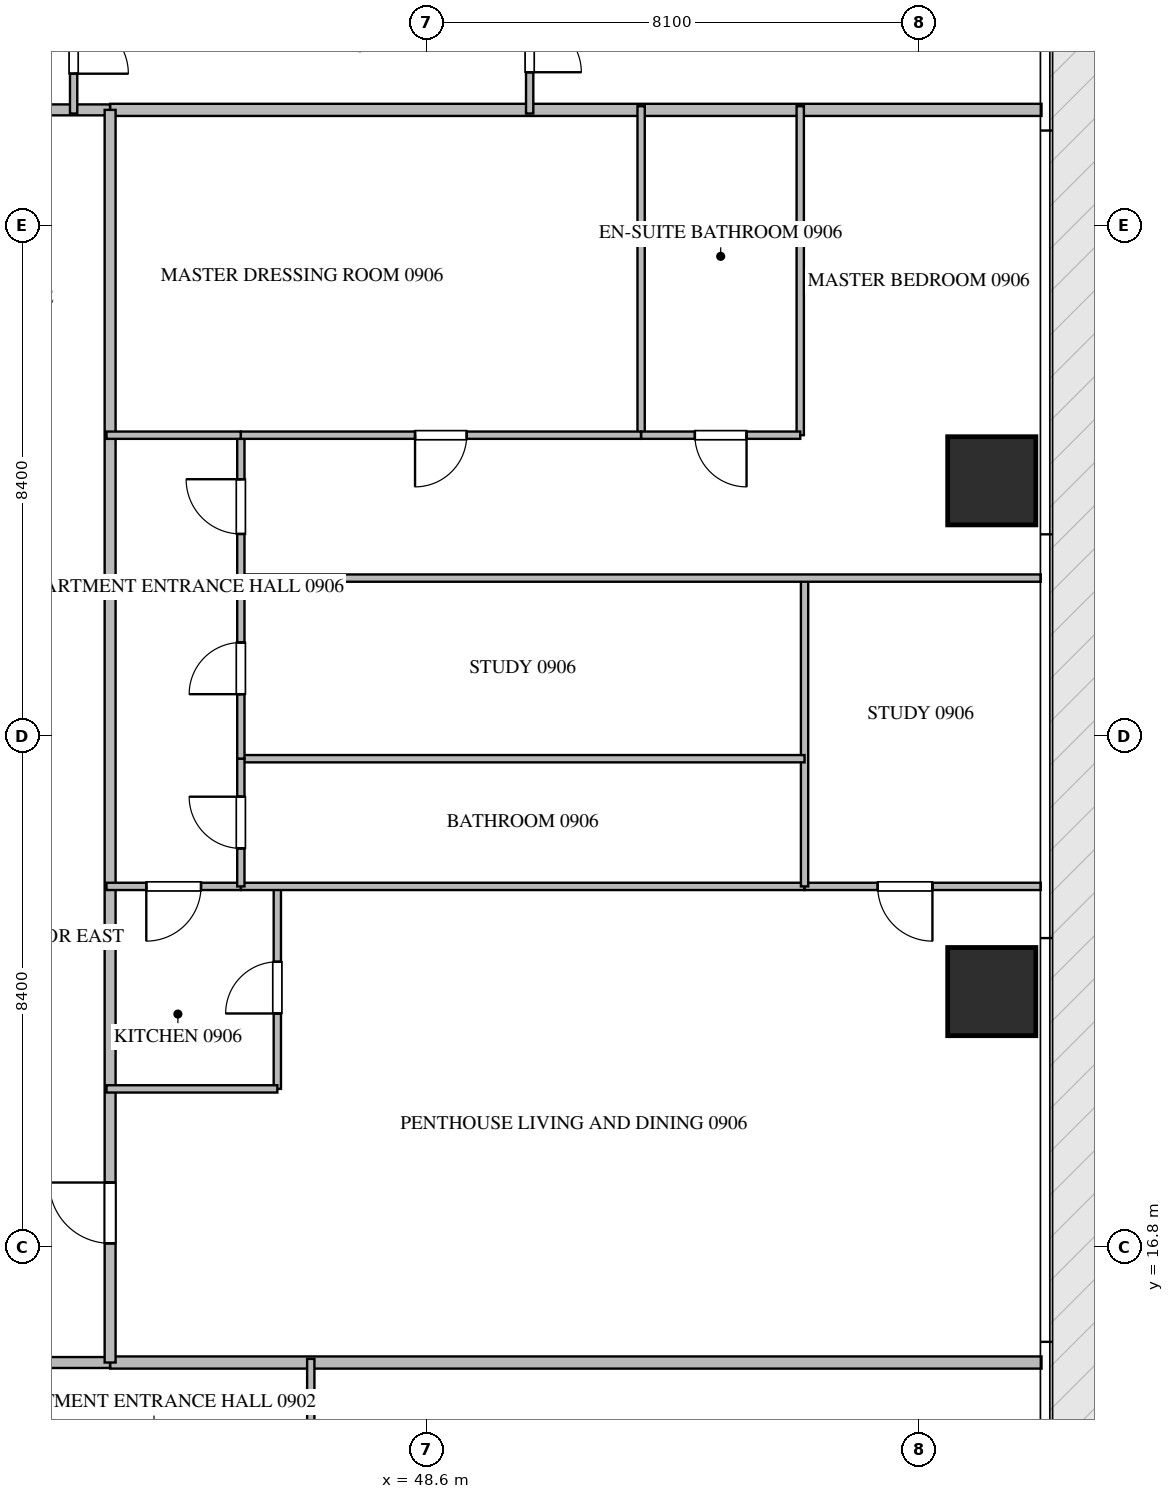
"""IFC4 building model, lengths in metres.
Left out: names, types, materials, properties, quantities, classifications, styles, units other than length and angle.
Written with IfcOpenShell. Run it as: python <this file> out.ifc"""

import sys

from ifc_helpers import new_model, si_unit, direction, frame, frame_2d, origin, origin_2d, place, context, subcontext, project, spatial, rectangle, extrude, source, transform, mapped, element, fill, save


model = new_model("IFC4")
c1 = context("Model", 3, precision=1e-05, world=origin(), true_north=direction((0.0, 1.0)))
c2 = subcontext(c1, "Body", "Model", "MODEL_VIEW")
j1 = project(units=[si_unit("LENGTHUNIT", "METRE"), si_unit("PLANEANGLEUNIT", "RADIAN")], contexts=[c1])
p1 = place(None, origin())
s1 = spatial("IfcSite", under=j1, at=p1, CompositionType="ELEMENT")
p2 = place(p1, origin())
s2 = spatial("IfcBuilding", under=s1, at=p2, CompositionType="ELEMENT")
p3 = place(p2, frame((0.0, 0.0, 41.7)))
s3 = spatial("IfcBuildingStorey", under=s2, at=p3, CompositionType="ELEMENT", Elevation=41.7)
m1 = source(origin(), c2, "Body", "SweptSolid", [
    extrude(rectangle(XDim=1.45, YDim=1.45, at=origin_2d()), origin(), (0.0, 0.0, 1.0), 3.75),
])
for number, where, z_axis, x_axis in (
    (1, (57.9, 21.0, -0.26), (0.0, 0.0, 1.0), (1.0, 0.0, 0.0)),
    (2, (57.9, 29.4, -0.26), (0.0, 0.0, 1.0), (1.0, 0.0, 0.0)),
):
    element("IfcColumn", number, at=place(p3, frame(where, z_axis=z_axis, x_axis=x_axis)), inside=s3, PredefinedType="COLUMN", context=c2, shape_type="MappedRepresentation", body=[
        mapped(m1, transform((0.0, 0.0, 0.0), scale=1.0)),
    ])
for number, where, z_axis, x_axis in (
    (3, (43.4, 14.9, 0.0), (0.0, 0.0, 1.0), (1.0, 0.0, 0.0)),
    (4, (43.4, 35.5, 0.0), (0.0, 0.0, 1.0), (1.0, 0.0, 0.0)),
):
    element("IfcWall", number, at=place(p3, frame(where, z_axis=z_axis, x_axis=x_axis)), inside=s3, PredefinedType="PARTITIONING", context=c2, shape_type="SweptSolid", body=[
        extrude(rectangle(XDim=15.318, YDim=0.2, at=frame_2d((7.659, 0.0))), origin(), (0.0, 0.0, 1.0), 3.49),
    ])
p4 = place(p3, frame((21.402, 14.9, 0.0), z_axis=(0.0, 0.0, 1.0), x_axis=(1.0, 0.0, 0.0)))
e5 = element("IfcWall", 5, at=p4, inside=s3, PredefinedType="PARTITIONING", context=c2, shape_type="SweptSolid", body=[
    extrude(rectangle(XDim=21.996, YDim=0.18, at=frame_2d((10.998, 0.0))), origin(), (0.0, 0.0, 1.0), 3.49),
])
p5 = place(p4, frame((5.816, 0.0, 0.0)))
e6 = element("IfcOpeningElement", 6, at=p5, cuts=e5, PredefinedType="OPENING", context=c2, shape_type="SweptSolid", body=[
    extrude(rectangle(XDim=1.0, YDim=2.15, at=frame_2d((0.5, 1.075))), frame((0.0, 0.1, 0.0), z_axis=(0.0, -1.0, 0.0), x_axis=(1.0, 0.0, 0.0)), (0.0, 0.0, 1.0), 0.2),
])
p6 = place(p4, frame((11.044, 0.0, 0.0)))
e7 = element("IfcOpeningElement", 7, at=p6, cuts=e5, PredefinedType="OPENING", context=c2, shape_type="SweptSolid", body=[
    extrude(rectangle(XDim=1.0, YDim=2.15, at=frame_2d((0.5, 1.075))), frame((0.0, 0.1, 0.0), z_axis=(0.0, -1.0, 0.0), x_axis=(1.0, 0.0, 0.0)), (0.0, 0.0, 1.0), 0.2),
])
p7 = place(p3, frame((21.402, 35.5, 0.0), z_axis=(0.0, 0.0, 1.0), x_axis=(1.0, 0.0, 0.0)))
e8 = element("IfcWall", 8, at=p7, inside=s3, PredefinedType="PARTITIONING", context=c2, shape_type="SweptSolid", body=[
    extrude(rectangle(XDim=21.996, YDim=0.18, at=frame_2d((10.998, 0.0))), origin(), (0.0, 0.0, 1.0), 3.49),
])
p8 = place(p7, frame((9.952, 0.0, 0.0)))
e9 = element("IfcOpeningElement", 9, at=p8, cuts=e8, PredefinedType="OPENING", context=c2, shape_type="SweptSolid", body=[
    extrude(rectangle(XDim=1.0, YDim=2.15, at=frame_2d((0.5, 1.075))), frame((0.0, 0.1, 0.0), z_axis=(0.0, -1.0, 0.0), x_axis=(1.0, 0.0, 0.0)), (0.0, 0.0, 1.0), 0.2),
])
p9 = place(p7, frame((15.18, 0.0, 0.0)))
e10 = element("IfcOpeningElement", 10, at=p9, cuts=e8, PredefinedType="OPENING", context=c2, shape_type="SweptSolid", body=[
    extrude(rectangle(XDim=1.0, YDim=2.15, at=frame_2d((0.5, 1.075))), frame((0.0, 0.1, 0.0), z_axis=(0.0, -1.0, 0.0), x_axis=(1.0, 0.0, 0.0)), (0.0, 0.0, 1.0), 0.2),
])
p10 = place(p3, frame((43.4, 14.9, 0.0), z_axis=(0.0, 0.0, 1.0), x_axis=(0.0, 1.0, 0.0)))
e11 = element("IfcWall", 11, at=p10, inside=s3, PredefinedType="PARTITIONING", context=c2, shape_type="SweptSolid", body=[
    extrude(rectangle(XDim=20.6, YDim=0.18, at=frame_2d((10.3, 0.0))), origin(), (0.0, 0.0, 1.0), 3.49),
])
p11 = place(p10, frame((1.96, 0.0, 0.0)))
e12 = element("IfcOpeningElement", 12, at=p11, cuts=e11, PredefinedType="OPENING", context=c2, shape_type="SweptSolid", body=[
    extrude(rectangle(XDim=1.0, YDim=2.15, at=frame_2d((0.5, 1.075))), frame((0.0, 0.1, 0.0), z_axis=(0.0, -1.0, 0.0), x_axis=(1.0, 0.0, 0.0)), (0.0, 0.0, 1.0), 0.2),
])
p12 = place(p3, frame((46.7, 12.752, 0.0), z_axis=(0.0, 0.0, 1.0), x_axis=(0.0, 1.0, 0.0)))
e13 = element("IfcWall", 13, at=p12, inside=s3, PredefinedType="PARTITIONING", context=c2, shape_type="SweptSolid", body=[
    extrude(rectangle(XDim=2.208, YDim=0.12, at=frame_2d((1.104, 0.0))), origin(), (0.0, 0.0, 1.0), 3.49),
])
p13 = place(p3, frame((42.8, 37.65, 0.0), z_axis=(0.0, 0.0, 1.0), x_axis=(0.0, -1.0, 0.0)))
e14 = element("IfcWall", 14, at=p13, inside=s3, PredefinedType="PARTITIONING", context=c2, shape_type="SweptSolid", body=[
    extrude(rectangle(XDim=2.21, YDim=0.12, at=frame_2d((1.105, 0.0))), origin(), (0.0, 0.0, 1.0), 3.49),
])
p14 = place(p13, frame((0.655, 0.0, 0.0)))
e15 = element("IfcOpeningElement", 15, at=p14, cuts=e14, PredefinedType="OPENING", context=c2, shape_type="SweptSolid", body=[
    extrude(rectangle(XDim=0.9, YDim=2.1, at=frame_2d((0.45, 1.05))), frame((0.0, 0.07, 0.0), z_axis=(0.0, -1.0, 0.0), x_axis=(1.0, 0.0, 0.0)), (0.0, 0.0, 1.0), 0.14),
])
p15 = place(p3, frame((50.3, 37.648, 0.0), z_axis=(0.0, 0.0, 1.0), x_axis=(0.0, -1.0, 0.0)))
e16 = element("IfcWall", 16, at=p15, inside=s3, PredefinedType="PARTITIONING", context=c2, shape_type="SweptSolid", body=[
    extrude(rectangle(XDim=2.208, YDim=0.12, at=frame_2d((1.104, 0.0))), origin(), (0.0, 0.0, 1.0), 3.49),
])
p16 = place(p15, frame((0.679, 0.0, 0.0)))
e17 = element("IfcOpeningElement", 17, at=p16, cuts=e16, PredefinedType="OPENING", context=c2, shape_type="SweptSolid", body=[
    extrude(rectangle(XDim=0.85, YDim=2.1, at=frame_2d((0.425, 1.05))), frame((0.0, 0.07, 0.0), z_axis=(0.0, -1.0, 0.0), x_axis=(1.0, 0.0, 0.0)), (0.0, 0.0, 1.0), 0.14),
])
p17 = place(p3, frame((46.15, 19.4, 0.0), z_axis=(0.0, 0.0, 1.0), x_axis=(0.0, 1.0, 0.0)))
e18 = element("IfcWall", 18, at=p17, inside=s3, PredefinedType="PARTITIONING", context=c2, shape_type="SweptSolid", body=[
    extrude(rectangle(XDim=3.33, YDim=0.12, at=frame_2d((1.665, 0.0))), origin(), (0.0, 0.0, 1.0), 3.49),
])
p18 = place(p17, frame((1.24, 0.0, 0.0)))
e19 = element("IfcOpeningElement", 19, at=p18, cuts=e18, PredefinedType="OPENING", context=c2, shape_type="SweptSolid", body=[
    extrude(rectangle(XDim=0.85, YDim=2.1, at=frame_2d((0.425, 1.05))), frame((0.0, 0.07, 0.0), z_axis=(0.0, -1.0, 0.0), x_axis=(1.0, 0.0, 0.0)), (0.0, 0.0, 1.0), 0.14),
])
p19 = place(p3, frame((46.15, 19.4, 0.0), z_axis=(0.0, 0.0, 1.0), x_axis=(-1.0, 0.0, 0.0)))
e20 = element("IfcWall", 20, at=p19, inside=s3, PredefinedType="PARTITIONING", context=c2, shape_type="SweptSolid", body=[
    extrude(rectangle(XDim=2.81, YDim=0.12, at=frame_2d((1.405, 0.0))), origin(), (0.0, 0.0, 1.0), 3.49),
])
p20 = place(p3, frame((45.55, 22.73, 0.0), z_axis=(0.0, 0.0, 1.0), x_axis=(-1.0, 0.0, 0.0)))
e21 = element("IfcWall", 21, at=p20, inside=s3, PredefinedType="PARTITIONING", context=c2, shape_type="SweptSolid", body=[
    extrude(rectangle(XDim=2.21, YDim=0.12, at=frame_2d((1.105, 0.0))), origin(), (0.0, 0.0, 1.0), 3.49),
])
p21 = place(p20, frame((0.655, 0.0, 0.0)))
e22 = element("IfcOpeningElement", 22, at=p21, cuts=e21, PredefinedType="OPENING", context=c2, shape_type="SweptSolid", body=[
    extrude(rectangle(XDim=0.9, YDim=2.1, at=frame_2d((0.45, 1.05))), frame((0.0, 0.07, 0.0), z_axis=(0.0, -1.0, 0.0), x_axis=(1.0, 0.0, 0.0)), (0.0, 0.0, 1.0), 0.14),
])
p22 = place(p3, frame((58.705, 22.73, 0.0), z_axis=(0.0, 0.0, 1.0), x_axis=(-1.0, 0.0, 0.0)))
e23 = element("IfcWall", 23, at=p22, inside=s3, PredefinedType="PARTITIONING", context=c2, shape_type="SweptSolid", body=[
    extrude(rectangle(XDim=3.884, YDim=0.12, at=frame_2d((1.942, 0.0))), origin(), (0.0, 0.0, 1.0), 3.49),
])
p23 = place(p22, frame((1.781, 0.0, 0.0)))
e24 = element("IfcOpeningElement", 24, at=p23, cuts=e23, PredefinedType="OPENING", context=c2, shape_type="SweptSolid", body=[
    extrude(rectangle(XDim=0.9, YDim=2.1, at=frame_2d((0.45, 1.05))), frame((0.0, 0.07, 0.0), z_axis=(0.0, -1.0, 0.0), x_axis=(1.0, 0.0, 0.0)), (0.0, 0.0, 1.0), 0.14),
])
p24 = place(p3, frame((54.819, 22.73, 0.0), z_axis=(0.0, 0.0, 1.0), x_axis=(-1.0, 0.0, 0.0)))
e25 = element("IfcWall", 25, at=p24, inside=s3, PredefinedType="PARTITIONING", context=c2, shape_type="SweptSolid", body=[
    extrude(rectangle(XDim=9.267, YDim=0.12, at=frame_2d((4.634, 0.0))), origin(), (0.0, 0.0, 1.0), 3.49),
])
p25 = place(p3, frame((54.821, 22.73, 0.0), z_axis=(0.0, 0.0, 1.0), x_axis=(0.0, 1.0, 0.0)))
e26 = element("IfcWall", 26, at=p25, inside=s3, PredefinedType="PARTITIONING", context=c2, shape_type="SweptSolid", body=[
    extrude(rectangle(XDim=5.07, YDim=0.12, at=frame_2d((2.535, 0.0))), origin(), (0.0, 0.0, 1.0), 3.49),
])
p26 = place(p3, frame((58.705, 27.8, 0.0), z_axis=(0.0, 0.0, 1.0), x_axis=(-1.0, 0.0, 0.0)))
e27 = element("IfcWall", 27, at=p26, inside=s3, PredefinedType="PARTITIONING", context=c2, shape_type="SweptSolid", body=[
    extrude(rectangle(XDim=13.155, YDim=0.12, at=frame_2d((6.578, 0.0))), origin(), (0.0, 0.0, 1.0), 3.49),
])
p27 = place(p3, frame((54.821, 24.83, 0.0), z_axis=(0.0, 0.0, 1.0), x_axis=(-1.0, 0.0, 0.0)))
e28 = element("IfcWall", 28, at=p27, inside=s3, PredefinedType="PARTITIONING", context=c2, shape_type="SweptSolid", body=[
    extrude(rectangle(XDim=9.271, YDim=0.12, at=frame_2d((4.635, 0.0))), origin(), (0.0, 0.0, 1.0), 3.49),
])
p28 = place(p3, frame((45.55, 22.73, 0.0), z_axis=(0.0, 0.0, 1.0), x_axis=(0.0, 1.0, 0.0)))
e29 = element("IfcWall", 29, at=p28, inside=s3, PredefinedType="PARTITIONING", context=c2, shape_type="SweptSolid", body=[
    extrude(rectangle(XDim=2.1, YDim=0.12, at=frame_2d((1.05, 0.0))), origin(), (0.0, 0.0, 1.0), 3.49),
])
p29 = place(p28, frame((0.625, 0.0, 0.0)))
e30 = element("IfcOpeningElement", 30, at=p29, cuts=e29, PredefinedType="OPENING", context=c2, shape_type="SweptSolid", body=[
    extrude(rectangle(XDim=0.85, YDim=2.1, at=frame_2d((0.425, 1.05))), frame((0.0, 0.07, 0.0), z_axis=(0.0, -1.0, 0.0), x_axis=(1.0, 0.0, 0.0)), (0.0, 0.0, 1.0), 0.14),
])
p30 = place(p3, frame((45.55, 24.832, 0.0), z_axis=(0.0, 0.0, 1.0), x_axis=(0.0, 1.0, 0.0)))
e31 = element("IfcWall", 31, at=p30, inside=s3, PredefinedType="PARTITIONING", context=c2, shape_type="SweptSolid", body=[
    extrude(rectangle(XDim=2.968, YDim=0.12, at=frame_2d((1.484, 0.0))), origin(), (0.0, 0.0, 1.0), 3.49),
])
p31 = place(p30, frame((1.059, 0.0, 0.0)))
e32 = element("IfcOpeningElement", 32, at=p31, cuts=e31, PredefinedType="OPENING", context=c2, shape_type="SweptSolid", body=[
    extrude(rectangle(XDim=0.85, YDim=2.1, at=frame_2d((0.425, 1.05))), frame((0.0, 0.07, 0.0), z_axis=(0.0, -1.0, 0.0), x_axis=(1.0, 0.0, 0.0)), (0.0, 0.0, 1.0), 0.14),
])
p32 = place(p3, frame((45.55, 27.802, 0.0), z_axis=(0.0, 0.0, 1.0), x_axis=(0.0, 1.0, 0.0)))
e33 = element("IfcWall", 33, at=p32, inside=s3, PredefinedType="PARTITIONING", context=c2, shape_type="SweptSolid", body=[
    extrude(rectangle(XDim=2.348, YDim=0.12, at=frame_2d((1.174, 0.0))), origin(), (0.0, 0.0, 1.0), 3.49),
])
p33 = place(p32, frame((0.724, 0.0, 0.0)))
e34 = element("IfcOpeningElement", 34, at=p33, cuts=e33, PredefinedType="OPENING", context=c2, shape_type="SweptSolid", body=[
    extrude(rectangle(XDim=0.9, YDim=2.1, at=frame_2d((0.45, 1.05))), frame((0.0, 0.07, 0.0), z_axis=(0.0, -1.0, 0.0), x_axis=(1.0, 0.0, 0.0)), (0.0, 0.0, 1.0), 0.14),
])
for number, where, z_axis, x_axis in (
    (35, (54.75, 30.15, 0.0), (0.0, 0.0, 1.0), (0.0, 1.0, 0.0)),
    (36, (52.133, 30.15, 0.0), (0.0, 0.0, 1.0), (0.0, 1.0, 0.0)),
):
    element("IfcWall", number, at=place(p3, frame(where, z_axis=z_axis, x_axis=x_axis)), inside=s3, PredefinedType="PARTITIONING", context=c2, shape_type="SweptSolid", body=[
        extrude(rectangle(XDim=5.41, YDim=0.12, at=frame_2d((2.705, 0.0))), origin(), (0.0, 0.0, 1.0), 3.49),
    ])
p34 = place(p3, frame((54.75, 30.15, 0.0), z_axis=(0.0, 0.0, 1.0), x_axis=(-1.0, 0.0, 0.0)))
e37 = element("IfcWall", 37, at=p34, inside=s3, PredefinedType="PARTITIONING", context=c2, shape_type="SweptSolid", body=[
    extrude(rectangle(XDim=2.617, YDim=0.12, at=frame_2d((1.309, 0.0))), origin(), (0.0, 0.0, 1.0), 3.49),
])
p35 = place(p34, frame((0.883, 0.0, 0.0)))
e38 = element("IfcOpeningElement", 38, at=p35, cuts=e37, PredefinedType="OPENING", context=c2, shape_type="SweptSolid", body=[
    extrude(rectangle(XDim=0.85, YDim=2.1, at=frame_2d((0.425, 1.05))), frame((0.0, 0.07, 0.0), z_axis=(0.0, -1.0, 0.0), x_axis=(1.0, 0.0, 0.0)), (0.0, 0.0, 1.0), 0.14),
])
p36 = place(p3, frame((52.131, 30.15, 0.0), z_axis=(0.0, 0.0, 1.0), x_axis=(-1.0, 0.0, 0.0)))
e39 = element("IfcWall", 39, at=p36, inside=s3, PredefinedType="PARTITIONING", context=c2, shape_type="SweptSolid", body=[
    extrude(rectangle(XDim=6.581, YDim=0.12, at=frame_2d((3.291, 0.0))), origin(), (0.0, 0.0, 1.0), 3.49),
])
p37 = place(p36, frame((2.866, 0.0, 0.0)))
e40 = element("IfcOpeningElement", 40, at=p37, cuts=e39, PredefinedType="OPENING", context=c2, shape_type="SweptSolid", body=[
    extrude(rectangle(XDim=0.85, YDim=2.1, at=frame_2d((0.425, 1.05))), frame((0.0, 0.07, 0.0), z_axis=(0.0, -1.0, 0.0), x_axis=(1.0, 0.0, 0.0)), (0.0, 0.0, 1.0), 0.14),
])
p38 = place(p3, frame((45.548, 30.15, 0.0), z_axis=(0.0, 0.0, 1.0), x_axis=(-1.0, 0.0, 0.0)))
e41 = element("IfcWall", 41, at=p38, inside=s3, PredefinedType="PARTITIONING", context=c2, shape_type="SweptSolid", body=[
    extrude(rectangle(XDim=2.208, YDim=0.12, at=frame_2d((1.104, 0.0))), origin(), (0.0, 0.0, 1.0), 3.49),
])
m2 = source(origin(), c2, "Body", "SweptSolid", [
    extrude(rectangle(XDim=1.0, YDim=2.15, at=frame_2d((0.5, 1.075))), frame((0.0, 0.025, 0.0), z_axis=(0.0, -1.0, 0.0), x_axis=(1.0, 0.0, 0.0)), (0.0, 0.0, 1.0), 0.05),
])
p39 = place(p11, origin())
e42 = element("IfcDoor", 42, at=p39, inside=s3, OperationType="SINGLE_SWING_RIGHT", PredefinedType="DOOR", context=c2, shape_type="MappedRepresentation", body=[
    mapped(m2, transform((0.0, 0.0, 0.0), scale=1.0)),
])
fill(e12, e42)
m3 = source(origin(), c2, "Body", "SweptSolid", [
    extrude(rectangle(XDim=0.9, YDim=2.1, at=frame_2d((0.45, 1.05))), frame((0.0, 0.025, 0.0), z_axis=(0.0, -1.0, 0.0), x_axis=(1.0, 0.0, 0.0)), (0.0, 0.0, 1.0), 0.05),
])
p40 = place(p14, origin())
e43 = element("IfcDoor", 43, at=p40, inside=s3, OperationType="SINGLE_SWING_RIGHT", PredefinedType="DOOR", context=c2, shape_type="MappedRepresentation", body=[
    mapped(m3, transform((0.0, 0.0, 0.0), scale=1.0)),
])
fill(e15, e43)
m4 = source(origin(), c2, "Body", "SweptSolid", [
    extrude(rectangle(XDim=0.85, YDim=2.1, at=frame_2d((0.425, 1.05))), frame((0.0, 0.025, 0.0), z_axis=(0.0, -1.0, 0.0), x_axis=(1.0, 0.0, 0.0)), (0.0, 0.0, 1.0), 0.05),
])
p41 = place(p16, origin())
e44 = element("IfcDoor", 44, at=p41, inside=s3, OperationType="SINGLE_SWING_RIGHT", PredefinedType="DOOR", context=c2, shape_type="MappedRepresentation", body=[
    mapped(m4, transform((0.0, 0.0, 0.0), scale=1.0)),
])
fill(e17, e44)
p42 = place(p18, origin())
e45 = element("IfcDoor", 45, at=p42, inside=s3, OperationType="SINGLE_SWING_LEFT", PredefinedType="DOOR", context=c2, shape_type="MappedRepresentation", body=[
    mapped(m4, transform((0.0, 0.0, 0.0), scale=1.0)),
])
fill(e19, e45)
p43 = place(p21, origin())
e46 = element("IfcDoor", 46, at=p43, inside=s3, OperationType="SINGLE_SWING_RIGHT", PredefinedType="DOOR", context=c2, shape_type="MappedRepresentation", body=[
    mapped(m3, transform((0.0, 0.0, 0.0), scale=1.0)),
])
fill(e22, e46)
p44 = place(p23, origin())
e47 = element("IfcDoor", 47, at=p44, inside=s3, OperationType="SINGLE_SWING_LEFT", PredefinedType="DOOR", context=c2, shape_type="MappedRepresentation", body=[
    mapped(m3, transform((0.0, 0.0, 0.0), scale=1.0)),
])
fill(e24, e47)
p45 = place(p29, origin())
e48 = element("IfcDoor", 48, at=p45, inside=s3, OperationType="SINGLE_SWING_RIGHT", PredefinedType="DOOR", context=c2, shape_type="MappedRepresentation", body=[
    mapped(m4, transform((0.0, 0.0, 0.0), scale=1.0)),
])
fill(e30, e48)
p46 = place(p31, origin())
e49 = element("IfcDoor", 49, at=p46, inside=s3, OperationType="SINGLE_SWING_LEFT", PredefinedType="DOOR", context=c2, shape_type="MappedRepresentation", body=[
    mapped(m4, transform((0.0, 0.0, 0.0), scale=1.0)),
])
fill(e32, e49)
p47 = place(p33, origin())
e50 = element("IfcDoor", 50, at=p47, inside=s3, OperationType="SINGLE_SWING_RIGHT", PredefinedType="DOOR", context=c2, shape_type="MappedRepresentation", body=[
    mapped(m3, transform((0.0, 0.0, 0.0), scale=1.0)),
])
fill(e34, e50)
p48 = place(p35, origin())
e51 = element("IfcDoor", 51, at=p48, inside=s3, OperationType="SINGLE_SWING_LEFT", PredefinedType="DOOR", context=c2, shape_type="MappedRepresentation", body=[
    mapped(m4, transform((0.0, 0.0, 0.0), scale=1.0)),
])
fill(e38, e51)
p49 = place(p37, origin())
e52 = element("IfcDoor", 52, at=p49, inside=s3, OperationType="SINGLE_SWING_RIGHT", PredefinedType="DOOR", context=c2, shape_type="MappedRepresentation", body=[
    mapped(m4, transform((0.0, 0.0, 0.0), scale=1.0)),
])
fill(e40, e52)
save(model, sys.argv[1])
